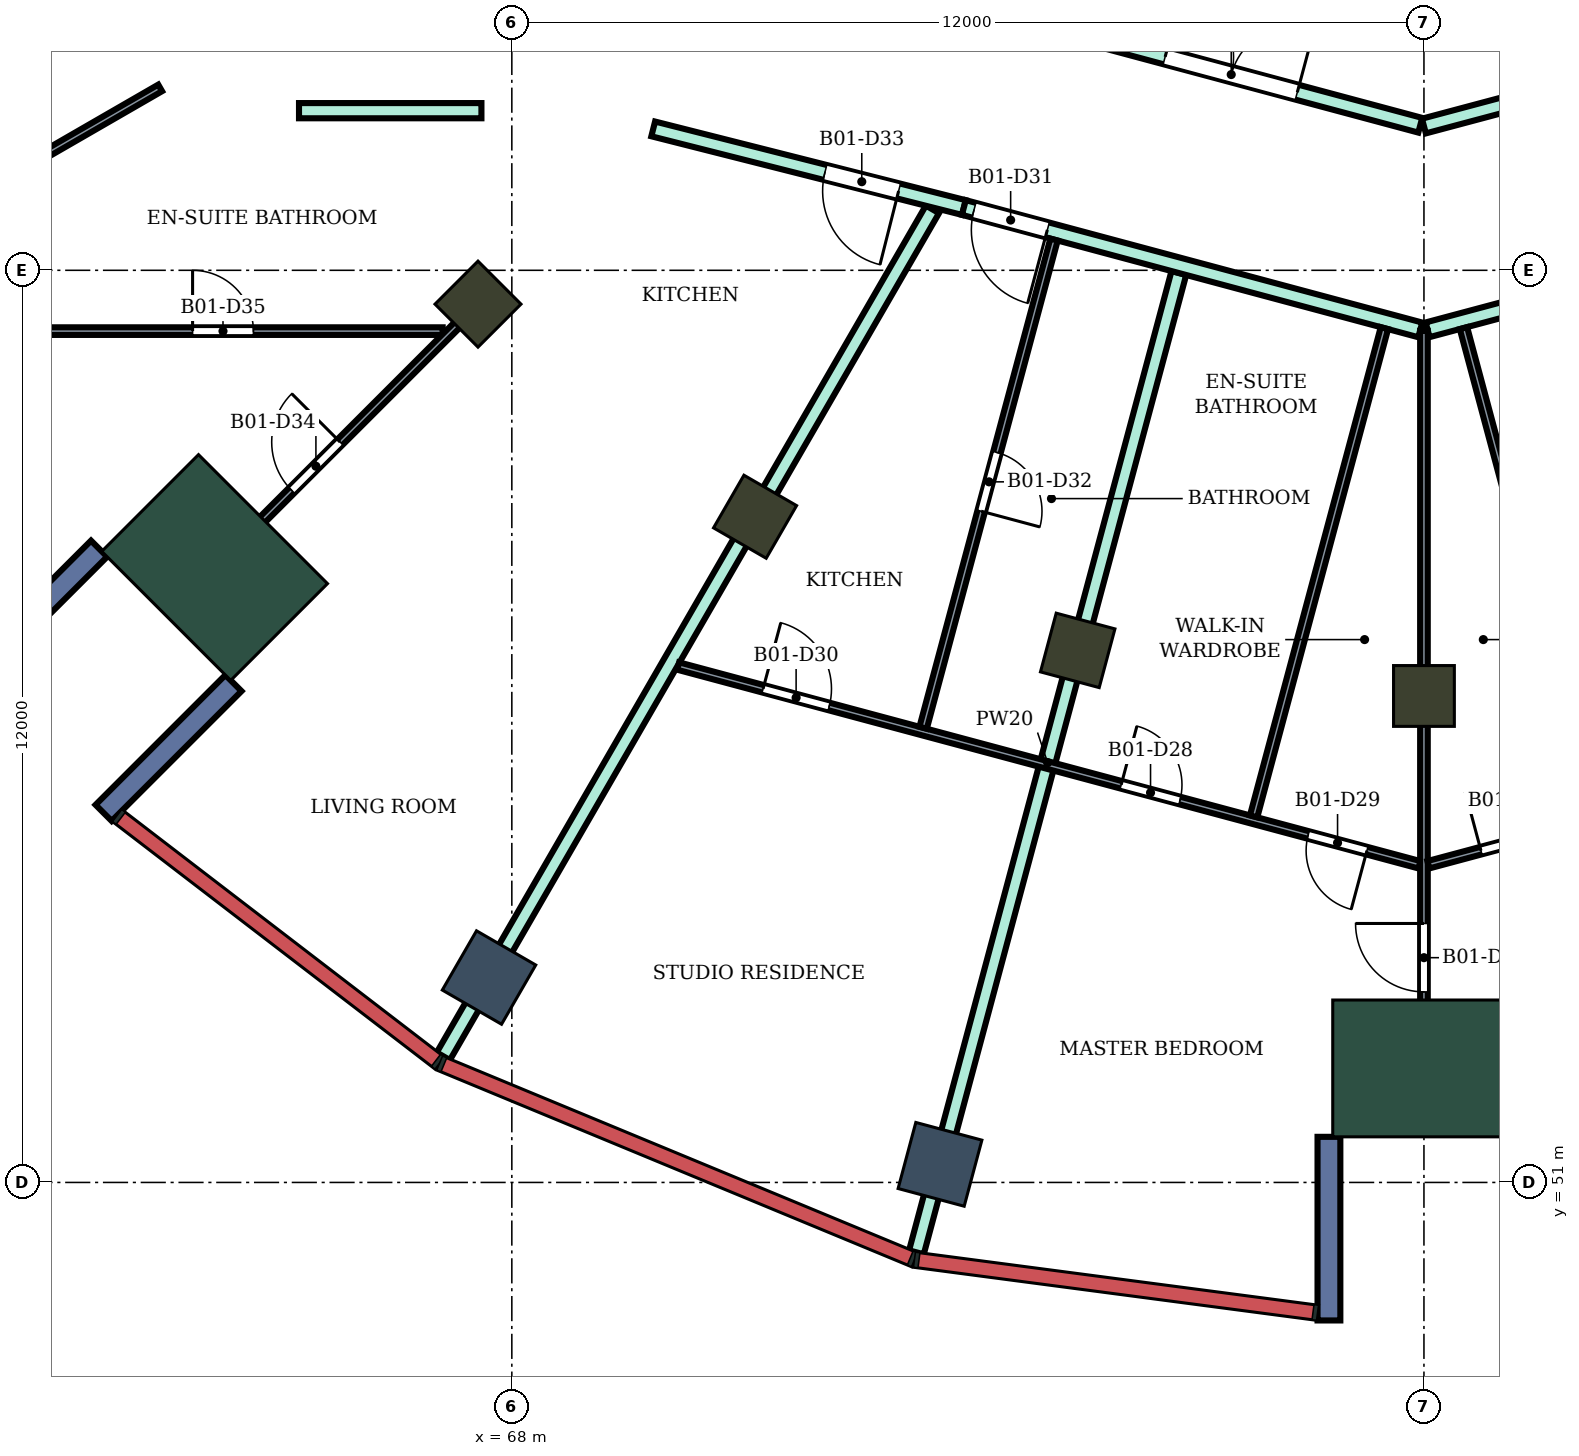
"""IFC4 building model, lengths in metres.
Left out: names, types, materials, properties, quantities, classifications, styles, units other than length and angle.
Written with IfcOpenShell. Run it as: python <this file> out.ifc"""

import sys

from ifc_helpers import new_model, si_unit, direction, frame, frame_2d, origin, origin_2d, place, context, subcontext, project, spatial, rectangle, extrude, element, fill, save


model = new_model("IFC4")
c1 = context("Model", 3, precision=1e-05, world=origin(), true_north=direction((0.0, 1.0)))
c2 = subcontext(c1, "Body", "Model", "MODEL_VIEW")
j1 = project(units=[si_unit("LENGTHUNIT", "METRE"), si_unit("PLANEANGLEUNIT", "RADIAN")], contexts=[c1])
p1 = place(None, origin())
s1 = spatial("IfcSite", under=j1, at=p1, CompositionType="ELEMENT")
p2 = place(p1, origin())
s2 = spatial("IfcBuilding", under=s1, at=p2, CompositionType="ELEMENT")
p3 = place(p2, frame((0.0, 0.0, 216.7)))
s3 = spatial("IfcBuildingStorey", under=s2, at=p3, CompositionType="ELEMENT", Elevation=216.7)
for number, where, z_axis, x_axis in (
    (1, (67.7, 53.696, 0.0), (0.0, 0.0, 1.0), (-0.5, -0.866, 0.0)),
    (2, (73.633, 51.238, 0.0), (0.0, 0.0, 1.0), (-0.259, -0.966, 0.0)),
):
    element("IfcColumn", number, at=place(p3, frame(where, z_axis=z_axis, x_axis=x_axis)), inside=s3, PredefinedType="COLUMN", context=c2, shape_type="SweptSolid", body=[
        extrude(rectangle(XDim=0.9, YDim=0.9, at=origin_2d()), origin(), (0.0, 0.0, 1.0), 4.2),
    ])
for number, where, z_axis, x_axis in (
    (3, (67.555, 62.555, 0.0), (0.0, 0.0, 1.0), (-0.707, -0.707, 0.0)),
    (4, (71.2, 59.758, 0.0), (0.0, 0.0, 1.0), (-0.5, -0.866, 0.0)),
    (5, (75.445, 58.0, 0.0), (0.0, 0.0, 1.0), (-0.259, -0.966, 0.0)),
    (6, (80.0, 57.4, 0.0), (0.0, 0.0, 1.0), (0.0, -1.0, 0.0)),
):
    element("IfcColumn", number, at=place(p3, frame(where, z_axis=z_axis, x_axis=x_axis)), inside=s3, PredefinedType="COLUMN", context=c2, shape_type="SweptSolid", body=[
        extrude(rectangle(XDim=0.8, YDim=0.8, at=origin_2d()), origin(), (0.0, 0.0, 1.0), 4.2),
    ])
for number, where, z_axis, x_axis in (
    (7, (64.09, 59.09, 0.0), (0.0, 0.0, 1.0), (-0.707, -0.707, 0.0)),
    (8, (80.0, 52.5, 0.0), (0.0, 0.0, 1.0), (0.0, -1.0, 0.0)),
):
    element("IfcColumn", number, at=place(p3, frame(where, z_axis=z_axis, x_axis=x_axis)), inside=s3, PredefinedType="COLUMN", context=c2, shape_type="SweptSolid", body=[
        extrude(rectangle(XDim=1.8, YDim=2.4, at=origin_2d()), origin(), (0.0, 0.0, 1.0), 4.2),
    ])
for number, where, z_axis, x_axis in (
    (9, (62.57, 59.338, 0.0), (0.0, 0.0, 1.0), (-0.707, -0.707, 0.0)),
    (10, (64.338, 57.57, 0.0), (0.0, 0.0, 1.0), (-0.707, -0.707, 0.0)),
    (11, (78.75, 51.6, 0.0), (0.0, 0.0, 1.0), (0.0, -1.0, 0.0)),
):
    element("IfcWall", number, at=place(p3, frame(where, z_axis=z_axis, x_axis=x_axis)), inside=s3, PredefinedType="NOTDEFINED", context=c2, shape_type="SweptSolid", body=[
        extrude(rectangle(XDim=2.416, YDim=0.3, at=frame_2d((1.208, 0.0))), origin(), (0.0, 0.0, 1.0), 4.2),
    ])
p4 = place(p3, frame((65.2, 65.1, 0.0), z_axis=(0.0, 0.0, 1.0), x_axis=(1.0, 0.0, 0.0)))
e12 = element("IfcWall", 12, at=p4, inside=s3, PredefinedType="PARTITIONING", context=c2, shape_type="SweptSolid", body=[
    extrude(rectangle(XDim=2.4, YDim=0.2, at=frame_2d((1.2, 0.0))), origin(), (0.0, 0.0, 1.0), 3.75),
])
p5 = place(p3, frame((67.099, 52.66, 0.0), z_axis=(0.0, 0.0, 1.0), x_axis=(0.500120472712, 0.865955837658, 0.0)))
e13 = element("IfcWall", 13, at=p5, inside=s3, PredefinedType="PARTITIONING", context=c2, shape_type="SweptSolid", body=[
    extrude(rectangle(XDim=12.866, YDim=0.2, at=frame_2d((6.433, 0.0))), origin(), (0.0, 0.0, 1.0), 3.75),
])
p6 = place(p3, frame((69.86, 64.86, 0.0), z_axis=(0.0, 0.0, 1.0), x_axis=(0.96942980222, -0.245368821506, 0.0)))
e14 = element("IfcWall", 14, at=p6, inside=s3, PredefinedType="PARTITIONING", context=c2, shape_type="SweptSolid", body=[
    extrude(rectangle(XDim=4.216, YDim=0.2, at=frame_2d((2.108, 0.0))), origin(), (0.0, 0.0, 1.0), 3.75),
])
p7 = place(p6, frame((2.331, 0.0, 0.0)))
e15 = element("IfcOpeningElement", 15, at=p7, cuts=e14, PredefinedType="OPENING", context=c2, shape_type="SweptSolid", body=[
    extrude(rectangle(XDim=1.0, YDim=2.1, at=frame_2d((0.5, 1.05))), frame((0.0, 0.11, 0.0), z_axis=(0.0, -1.0, 0.0), x_axis=(1.0, 0.0, 0.0)), (0.0, 0.0, 1.0), 0.22),
])
p8 = place(p3, frame((73.323, 50.081, 0.0), z_axis=(0.0, 0.0, 1.0), x_axis=(0.258837030899, 0.96592100683, 0.0)))
e16 = element("IfcWall", 16, at=p8, inside=s3, PredefinedType="PARTITIONING", context=c2, shape_type="SweptSolid", body=[
    extrude(rectangle(XDim=13.338, YDim=0.2, at=frame_2d((6.669, 0.0))), origin(), (0.0, 0.0, 1.0), 3.75),
])
p9 = place(p3, frame((73.947, 63.826, 0.0), z_axis=(0.0, 0.0, 1.0), x_axis=(0.965876152316, -0.259004359784, 0.0)))
e17 = element("IfcWall", 17, at=p9, inside=s3, PredefinedType="PARTITIONING", context=c2, shape_type="SweptSolid", body=[
    extrude(rectangle(XDim=6.217, YDim=0.2, at=frame_2d((3.108, 0.0))), origin(), (0.0, 0.0, 1.0), 3.75),
])
p10 = place(p9, frame((0.137, 0.0, 0.0)))
e18 = element("IfcOpeningElement", 18, at=p10, cuts=e17, PredefinedType="OPENING", context=c2, shape_type="SweptSolid", body=[
    extrude(rectangle(XDim=1.0, YDim=2.1, at=frame_2d((0.5, 1.05))), frame((0.0, 0.11, 0.0), z_axis=(0.0, -1.0, 0.0), x_axis=(1.0, 0.0, 0.0)), (0.0, 0.0, 1.0), 0.22),
])
p11 = place(p3, frame((74.603, 66.342, 0.0), z_axis=(0.0, 0.0, 1.0), x_axis=(0.965895298152, -0.258932950796, 0.0)))
e19 = element("IfcWall", 19, at=p11, inside=s3, PredefinedType="PARTITIONING", context=c2, shape_type="SweptSolid", body=[
    extrude(rectangle(XDim=5.538, YDim=0.2, at=frame_2d((2.769, 0.0))), origin(), (0.0, 0.0, 1.0), 3.75),
])
p12 = place(p11, frame((2.062, 0.0, 0.0)))
e20 = element("IfcOpeningElement", 20, at=p12, cuts=e19, PredefinedType="OPENING", context=c2, shape_type="SweptSolid", body=[
    extrude(rectangle(XDim=1.8, YDim=2.1, at=frame_2d((0.9, 1.05))), frame((0.0, 0.11, 0.0), z_axis=(0.0, -1.0, 0.0), x_axis=(1.0, 0.0, 0.0)), (0.0, 0.0, 1.0), 0.22),
])
p13 = place(p3, frame((80.0, 64.898, 0.0), z_axis=(0.0, 0.0, 1.0), x_axis=(0.966237419782, 0.257653349704, 0.0)))
e21 = element("IfcWall", 21, at=p13, inside=s3, PredefinedType="PARTITIONING", context=c2, shape_type="SweptSolid", body=[
    extrude(rectangle(XDim=8.169, YDim=0.2, at=frame_2d((4.084, 0.0))), origin(), (0.0, 0.0, 1.0), 3.75),
])
p14 = place(p13, frame((6.428, 0.0, 0.0)))
e22 = element("IfcOpeningElement", 22, at=p14, cuts=e21, PredefinedType="OPENING", context=c2, shape_type="SweptSolid", body=[
    extrude(rectangle(XDim=0.9, YDim=2.1, at=frame_2d((0.45, 1.05))), frame((0.0, 0.11, 0.0), z_axis=(0.0, -1.0, 0.0), x_axis=(1.0, 0.0, 0.0)), (0.0, 0.0, 1.0), 0.22),
])
p15 = place(p3, frame((80.048, 62.217, 0.0), z_axis=(0.0, 0.0, 1.0), x_axis=(0.966097920642, 0.258175923996, 0.0)))
e23 = element("IfcWall", 23, at=p15, inside=s3, PredefinedType="PARTITIONING", context=c2, shape_type="SweptSolid", body=[
    extrude(rectangle(XDim=6.217, YDim=0.2, at=frame_2d((3.108, 0.0))), origin(), (0.0, 0.0, 1.0), 3.75),
])
p16 = place(p15, frame((3.792, 0.0, 0.0)))
e24 = element("IfcOpeningElement", 24, at=p16, cuts=e23, PredefinedType="OPENING", context=c2, shape_type="SweptSolid", body=[
    extrude(rectangle(XDim=1.0, YDim=2.1, at=frame_2d((0.5, 1.05))), frame((0.0, 0.11, 0.0), z_axis=(0.0, -1.0, 0.0), x_axis=(1.0, 0.0, 0.0)), (0.0, 0.0, 1.0), 0.22),
])
p17 = place(p3, frame((57.658, 62.102, 0.0), z_axis=(0.0, 0.0, 1.0), x_axis=(0.866131372301, 0.499816412211, 0.0)))
e25 = element("IfcWall", 25, at=p17, inside=s3, PredefinedType="PARTITIONING", context=c2, shape_type="SweptSolid", body=[
    extrude(rectangle(XDim=6.598, YDim=0.1, at=frame_2d((3.299, 0.0))), origin(), (0.0, 0.0, 1.0), 3.75),
])
p18 = place(p17, frame((1.77, 0.0, 0.0)))
e26 = element("IfcOpeningElement", 26, at=p18, cuts=e25, PredefinedType="OPENING", context=c2, shape_type="SweptSolid", body=[
    extrude(rectangle(XDim=0.9, YDim=2.1, at=frame_2d((0.45, 1.05))), frame((0.0, 0.06, 0.0), z_axis=(0.0, -1.0, 0.0), x_axis=(1.0, 0.0, 0.0)), (0.0, 0.0, 1.0), 0.12),
])
p19 = place(p3, frame((61.2, 62.2, 0.0), z_axis=(0.0, 0.0, 1.0), x_axis=(1.0, 0.0, 0.0)))
e27 = element("IfcWall", 27, at=p19, inside=s3, PredefinedType="PARTITIONING", context=c2, shape_type="SweptSolid", body=[
    extrude(rectangle(XDim=5.89, YDim=0.1, at=frame_2d((2.945, 0.0))), origin(), (0.0, 0.0, 1.0), 3.75),
])
p20 = place(p19, frame((2.6, 0.0, 0.0)))
e28 = element("IfcOpeningElement", 28, at=p20, cuts=e27, PredefinedType="OPENING", context=c2, shape_type="SweptSolid", body=[
    extrude(rectangle(XDim=0.8, YDim=2.1, at=frame_2d((0.4, 1.05))), frame((0.0, 0.06, 0.0), z_axis=(0.0, -1.0, 0.0), x_axis=(1.0, 0.0, 0.0)), (0.0, 0.0, 1.0), 0.12),
])
p21 = place(p3, frame((63.596, 58.596, 0.0), z_axis=(0.0, 0.0, 1.0), x_axis=(0.707106781187, 0.707106781187, 0.0)))
e29 = element("IfcWall", 29, at=p21, inside=s3, PredefinedType="PARTITIONING", context=c2, shape_type="SweptSolid", body=[
    extrude(rectangle(XDim=5.663, YDim=0.1, at=frame_2d((2.832, 0.0))), origin(), (0.0, 0.0, 1.0), 3.75),
])
p22 = place(p21, frame((2.134, 0.0, 0.0)))
e30 = element("IfcOpeningElement", 30, at=p22, cuts=e29, PredefinedType="OPENING", context=c2, shape_type="SweptSolid", body=[
    extrude(rectangle(XDim=0.9, YDim=2.1, at=frame_2d((0.45, 1.05))), frame((0.0, 0.06, 0.0), z_axis=(0.0, -1.0, 0.0), x_axis=(1.0, 0.0, 0.0)), (0.0, 0.0, 1.0), 0.12),
])
p23 = place(p3, frame((70.188, 57.794, 0.0), z_axis=(0.0, 0.0, 1.0), x_axis=(0.965894620005, -0.25893548047, 0.0)))
e31 = element("IfcWall", 31, at=p23, inside=s3, PredefinedType="PARTITIONING", context=c2, shape_type="SweptSolid", body=[
    extrude(rectangle(XDim=10.098, YDim=0.1, at=frame_2d((5.049, 0.0))), origin(), (0.0, 0.0, 1.0), 3.75),
])
p24 = place(p23, frame((6.034, 0.0, 0.0)))
e32 = element("IfcOpeningElement", 32, at=p24, cuts=e31, PredefinedType="OPENING", context=c2, shape_type="SweptSolid", body=[
    extrude(rectangle(XDim=0.8, YDim=2.1, at=frame_2d((0.4, 1.05))), frame((0.0, 0.06, 0.0), z_axis=(0.0, -1.0, 0.0), x_axis=(1.0, 0.0, 0.0)), (0.0, 0.0, 1.0), 0.12),
])
p25 = place(p23, frame((8.581, 0.0, 0.0)))
e33 = element("IfcOpeningElement", 33, at=p25, cuts=e31, PredefinedType="OPENING", context=c2, shape_type="SweptSolid", body=[
    extrude(rectangle(XDim=0.8, YDim=2.1, at=frame_2d((0.4, 1.05))), frame((0.0, 0.06, 0.0), z_axis=(0.0, -1.0, 0.0), x_axis=(1.0, 0.0, 0.0)), (0.0, 0.0, 1.0), 0.12),
])
p26 = place(p23, frame((1.156, 0.0, 0.0)))
e34 = element("IfcOpeningElement", 34, at=p26, cuts=e31, PredefinedType="OPENING", context=c2, shape_type="SweptSolid", body=[
    extrude(rectangle(XDim=0.9, YDim=2.1, at=frame_2d((0.45, 1.05))), frame((0.0, 0.06, 0.0), z_axis=(0.0, -1.0, 0.0), x_axis=(1.0, 0.0, 0.0)), (0.0, 0.0, 1.0), 0.12),
])
p27 = place(p3, frame((73.411, 56.982, 0.0), z_axis=(0.0, 0.0, 1.0), x_axis=(0.258992397652, 0.96587935994, 0.0)))
e35 = element("IfcWall", 35, at=p27, inside=s3, PredefinedType="PARTITIONING", context=c2, shape_type="SweptSolid", body=[
    extrude(rectangle(XDim=6.649, YDim=0.1, at=frame_2d((3.325, 0.0))), origin(), (0.0, 0.0, 1.0), 3.75),
])
p28 = place(p27, frame((2.95, 0.0, 0.0)))
e36 = element("IfcOpeningElement", 36, at=p28, cuts=e35, PredefinedType="OPENING", context=c2, shape_type="SweptSolid", body=[
    extrude(rectangle(XDim=0.8, YDim=2.1, at=frame_2d((0.4, 1.05))), frame((0.0, 0.06, 0.0), z_axis=(0.0, -1.0, 0.0), x_axis=(1.0, 0.0, 0.0)), (0.0, 0.0, 1.0), 0.12),
])
p29 = place(p3, frame((77.759, 55.816, 0.0), z_axis=(0.0, 0.0, 1.0), x_axis=(0.258802763352, 0.965930188824, 0.0)))
e37 = element("IfcWall", 37, at=p29, inside=s3, PredefinedType="PARTITIONING", context=c2, shape_type="SweptSolid", body=[
    extrude(rectangle(XDim=6.65, YDim=0.1, at=frame_2d((3.325, 0.0))), origin(), (0.0, 0.0, 1.0), 3.75),
])
p30 = place(p3, frame((80.0, 51.8, 0.0), z_axis=(0.0, 0.0, 1.0), x_axis=(0.0, 1.0, 0.0)))
e38 = element("IfcWall", 38, at=p30, inside=s3, PredefinedType="PARTITIONING", context=c2, shape_type="SweptSolid", body=[
    extrude(rectangle(XDim=10.404, YDim=0.1, at=frame_2d((5.202, 0.0))), origin(), (0.0, 0.0, 1.0), 3.75),
])
p31 = place(p30, frame((1.707, 0.0, 0.0)))
e39 = element("IfcOpeningElement", 39, at=p31, cuts=e38, PredefinedType="OPENING", context=c2, shape_type="SweptSolid", body=[
    extrude(rectangle(XDim=0.9, YDim=2.1, at=frame_2d((0.45, 1.05))), frame((0.0, 0.06, 0.0), z_axis=(0.0, -1.0, 0.0), x_axis=(1.0, 0.0, 0.0)), (0.0, 0.0, 1.0), 0.12),
])
p32 = place(p3, frame((80.058, 55.179, 0.0), z_axis=(0.0, 0.0, 1.0), x_axis=(0.965917403523, 0.258850477246, 0.0)))
e40 = element("IfcWall", 40, at=p32, inside=s3, PredefinedType="PARTITIONING", context=c2, shape_type="SweptSolid", body=[
    extrude(rectangle(XDim=5.014, YDim=0.1, at=frame_2d((2.507, 0.0))), origin(), (0.0, 0.0, 1.0), 3.75),
])
p33 = place(p32, frame((0.717, 0.0, 0.0)))
e41 = element("IfcOpeningElement", 41, at=p33, cuts=e40, PredefinedType="OPENING", context=c2, shape_type="SweptSolid", body=[
    extrude(rectangle(XDim=0.8, YDim=2.1, at=frame_2d((0.4, 1.05))), frame((0.0, 0.06, 0.0), z_axis=(0.0, -1.0, 0.0), x_axis=(1.0, 0.0, 0.0)), (0.0, 0.0, 1.0), 0.12),
])
p34 = place(p3, frame((80.52, 62.24, 0.0), z_axis=(0.0, 0.0, 1.0), x_axis=(0.258802763352, -0.965930188824, 0.0)))
e42 = element("IfcWall", 42, at=p34, inside=s3, PredefinedType="PARTITIONING", context=c2, shape_type="SweptSolid", body=[
    extrude(rectangle(XDim=6.65, YDim=0.1, at=frame_2d((3.325, 0.0))), origin(), (0.0, 0.0, 1.0), 3.75),
])
p35 = place(p33, origin())
e43 = element("IfcDoor", 43, at=p35, inside=s3, OperationType="SINGLE_SWING_LEFT", PredefinedType="DOOR", context=c2, shape_type="SweptSolid", body=[
    extrude(rectangle(XDim=0.8, YDim=2.1, at=frame_2d((0.4, 1.05))), frame((0.0, 0.025, 0.0), z_axis=(0.0, -1.0, 0.0), x_axis=(1.0, 0.0, 0.0)), (0.0, 0.0, 1.0), 0.05),
])
fill(e41, e43)
p36 = place(p31, origin())
e44 = element("IfcDoor", 44, at=p36, inside=s3, OperationType="SINGLE_SWING_RIGHT", PredefinedType="DOOR", context=c2, shape_type="SweptSolid", body=[
    extrude(rectangle(XDim=0.9, YDim=2.1, at=frame_2d((0.45, 1.05))), frame((0.0, 0.025, 0.0), z_axis=(0.0, -1.0, 0.0), x_axis=(1.0, 0.0, 0.0)), (0.0, 0.0, 1.0), 0.05),
])
fill(e39, e44)
p37 = place(p24, origin())
e45 = element("IfcDoor", 45, at=p37, inside=s3, OperationType="SINGLE_SWING_LEFT", PredefinedType="DOOR", context=c2, shape_type="SweptSolid", body=[
    extrude(rectangle(XDim=0.8, YDim=2.1, at=frame_2d((0.4, 1.05))), frame((0.0, 0.025, 0.0), z_axis=(0.0, -1.0, 0.0), x_axis=(1.0, 0.0, 0.0)), (0.0, 0.0, 1.0), 0.05),
])
fill(e32, e45)
p38 = place(p25, frame((0.8, 0.0, 0.0), z_axis=(0.0, 0.0, 1.0), x_axis=(-1.0, 0.0, 0.0)))
e46 = element("IfcDoor", 46, at=p38, inside=s3, OperationType="SINGLE_SWING_LEFT", PredefinedType="DOOR", context=c2, shape_type="SweptSolid", body=[
    extrude(rectangle(XDim=0.8, YDim=2.1, at=frame_2d((0.4, 1.05))), frame((0.0, 0.025, 0.0), z_axis=(0.0, -1.0, 0.0), x_axis=(1.0, 0.0, 0.0)), (0.0, 0.0, 1.0), 0.05),
])
fill(e33, e46)
p39 = place(p26, origin())
e47 = element("IfcDoor", 47, at=p39, inside=s3, OperationType="SINGLE_SWING_LEFT", PredefinedType="DOOR", context=c2, shape_type="SweptSolid", body=[
    extrude(rectangle(XDim=0.9, YDim=2.1, at=frame_2d((0.45, 1.05))), frame((0.0, 0.025, 0.0), z_axis=(0.0, -1.0, 0.0), x_axis=(1.0, 0.0, 0.0)), (0.0, 0.0, 1.0), 0.05),
])
fill(e34, e47)
p40 = place(p10, frame((1.0, 0.0, 0.0), z_axis=(0.0, 0.0, 1.0), x_axis=(-1.0, 0.0, 0.0)))
e48 = element("IfcDoor", 48, at=p40, inside=s3, OperationType="SINGLE_SWING_LEFT", PredefinedType="DOOR", context=c2, shape_type="SweptSolid", body=[
    extrude(rectangle(XDim=1.0, YDim=2.1, at=frame_2d((0.5, 1.05))), frame((0.0, 0.025, 0.0), z_axis=(0.0, -1.0, 0.0), x_axis=(1.0, 0.0, 0.0)), (0.0, 0.0, 1.0), 0.05),
])
fill(e18, e48)
p41 = place(p28, frame((0.8, 0.0, 0.0), z_axis=(0.0, 0.0, 1.0), x_axis=(-1.0, 0.0, 0.0)))
e49 = element("IfcDoor", 49, at=p41, inside=s3, OperationType="SINGLE_SWING_RIGHT", PredefinedType="DOOR", context=c2, shape_type="SweptSolid", body=[
    extrude(rectangle(XDim=0.8, YDim=2.1, at=frame_2d((0.4, 1.05))), frame((0.0, 0.025, 0.0), z_axis=(0.0, -1.0, 0.0), x_axis=(1.0, 0.0, 0.0)), (0.0, 0.0, 1.0), 0.05),
])
fill(e36, e49)
p42 = place(p7, frame((1.0, 0.0, 0.0), z_axis=(0.0, 0.0, 1.0), x_axis=(-1.0, 0.0, 0.0)))
e50 = element("IfcDoor", 50, at=p42, inside=s3, OperationType="SINGLE_SWING_LEFT", PredefinedType="DOOR", context=c2, shape_type="SweptSolid", body=[
    extrude(rectangle(XDim=1.0, YDim=2.1, at=frame_2d((0.5, 1.05))), frame((0.0, 0.025, 0.0), z_axis=(0.0, -1.0, 0.0), x_axis=(1.0, 0.0, 0.0)), (0.0, 0.0, 1.0), 0.05),
])
fill(e15, e50)
p43 = place(p22, origin())
e51 = element("IfcDoor", 51, at=p43, inside=s3, OperationType="SINGLE_SWING_RIGHT", PredefinedType="DOOR", context=c2, shape_type="SweptSolid", body=[
    extrude(rectangle(XDim=0.9, YDim=2.1, at=frame_2d((0.45, 1.05))), frame((0.0, 0.025, 0.0), z_axis=(0.0, -1.0, 0.0), x_axis=(1.0, 0.0, 0.0)), (0.0, 0.0, 1.0), 0.05),
])
fill(e30, e51)
p44 = place(p20, origin())
e52 = element("IfcDoor", 52, at=p44, inside=s3, OperationType="SINGLE_SWING_LEFT", PredefinedType="DOOR", context=c2, shape_type="SweptSolid", body=[
    extrude(rectangle(XDim=0.8, YDim=2.1, at=frame_2d((0.4, 1.05))), frame((0.0, 0.025, 0.0), z_axis=(0.0, -1.0, 0.0), x_axis=(1.0, 0.0, 0.0)), (0.0, 0.0, 1.0), 0.05),
])
fill(e28, e52)
p45 = place(p12, origin())
e53 = element("IfcDoor", 53, at=p45, inside=s3, OperationType="DOUBLE_DOOR_SINGLE_SWING", PredefinedType="DOOR", context=c2, shape_type="SweptSolid", body=[
    extrude(rectangle(XDim=1.8, YDim=2.1, at=frame_2d((0.9, 1.05))), frame((0.0, 0.025, 0.0), z_axis=(0.0, -1.0, 0.0), x_axis=(1.0, 0.0, 0.0)), (0.0, 0.0, 1.0), 0.05),
])
fill(e20, e53)
save(model, sys.argv[1])
